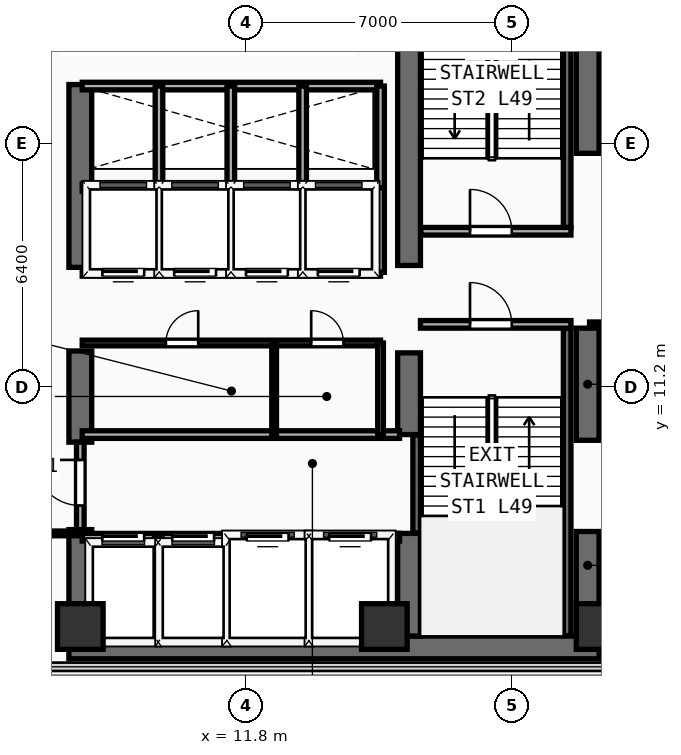
"""IFC4 building model, lengths in metres.
Left out: names, types, materials, properties, quantities, classifications, styles, units other than length and angle.
Written with IfcOpenShell. Run it as: python <this file> out.ifc"""

import sys

from ifc_helpers import new_model, si_unit, direction, frame, frame_2d, origin, origin_2d, place, context, subcontext, project, spatial, rectangle, extrude, element, fill, save


model = new_model("IFC4")
c1 = context("Model", 3, precision=1e-05, world=origin(), true_north=direction((0.0, 1.0)))
c2 = subcontext(c1, "Body", "Model", "MODEL_VIEW")
j1 = project(units=[si_unit("LENGTHUNIT", "METRE"), si_unit("PLANEANGLEUNIT", "RADIAN")], contexts=[c1])
p1 = place(None, origin())
s1 = spatial("IfcSite", under=j1, at=p1, CompositionType="ELEMENT")
p2 = place(p1, origin())
s2 = spatial("IfcBuilding", under=s1, at=p2, CompositionType="ELEMENT")
p3 = place(p2, frame((0.0, 0.0, 191.8)))
s3 = spatial("IfcBuildingStorey", under=s2, at=p3, CompositionType="ELEMENT", Elevation=191.8)
p4 = place(p3, frame((7.15, 4.35, 0.0), z_axis=(0.0, 0.0, 1.0), x_axis=(1.0, 0.0, 0.0)))
e1 = element("IfcWall", 1, at=p4, inside=s3, PredefinedType="SHEAR", context=c2, shape_type="SweptSolid", body=[
    extrude(rectangle(XDim=13.95, YDim=0.6, at=frame_2d((6.975, 0.0))), origin(), (0.0, 0.0, 1.0), 3.56),
])
p5 = place(p3, frame((7.45, 4.65, 0.0), z_axis=(0.0, 0.0, 1.0), x_axis=(0.0, 1.0, 0.0)))
e2 = element("IfcWall", 2, at=p5, inside=s3, PredefinedType="SHEAR", context=c2, shape_type="SweptSolid", body=[
    extrude(rectangle(XDim=2.8, YDim=0.6, at=frame_2d((1.4, 0.0))), origin(), (0.0, 0.0, 1.0), 3.56),
])
p6 = place(p3, frame((7.45, 9.75, 0.0), z_axis=(0.0, 0.0, 1.0), x_axis=(0.0, 1.0, 0.0)))
e3 = element("IfcWall", 3, at=p6, inside=s3, PredefinedType="SHEAR", context=c2, shape_type="SweptSolid", body=[
    extrude(rectangle(XDim=2.4, YDim=0.6, at=frame_2d((1.2, 0.0))), origin(), (0.0, 0.0, 1.0), 3.56),
])
p7 = place(p3, frame((7.45, 14.35, 0.0), z_axis=(0.0, 0.0, 1.0), x_axis=(0.0, 1.0, 0.0)))
e4 = element("IfcWall", 4, at=p7, inside=s3, PredefinedType="SHEAR", context=c2, shape_type="SweptSolid", body=[
    extrude(rectangle(XDim=4.81, YDim=0.6, at=frame_2d((2.405, 0.0))), origin(), (0.0, 0.0, 1.0), 3.56),
])
p8 = place(p3, frame((20.8, 4.65, 0.0), z_axis=(0.0, 0.0, 1.0), x_axis=(0.0, 1.0, 0.0)))
e5 = element("IfcWall", 5, at=p8, inside=s3, PredefinedType="SHEAR", context=c2, shape_type="SweptSolid", body=[
    extrude(rectangle(XDim=2.75, YDim=0.6, at=frame_2d((1.375, 0.0))), origin(), (0.0, 0.0, 1.0), 3.56),
])
p9 = place(p3, frame((20.8, 9.8, 0.0), z_axis=(0.0, 0.0, 1.0), x_axis=(0.0, 1.0, 0.0)))
e6 = element("IfcWall", 6, at=p9, inside=s3, PredefinedType="SHEAR", context=c2, shape_type="SweptSolid", body=[
    extrude(rectangle(XDim=2.95, YDim=0.6, at=frame_2d((1.475, 0.0))), origin(), (0.0, 0.0, 1.0), 3.56),
])
p10 = place(p3, frame((20.8, 17.35, 0.0), z_axis=(0.0, 0.0, 1.0), x_axis=(0.0, 1.0, 0.0)))
e7 = element("IfcWall", 7, at=p10, inside=s3, PredefinedType="SHEAR", context=c2, shape_type="SweptSolid", body=[
    extrude(rectangle(XDim=6.15, YDim=0.6, at=frame_2d((3.075, 0.0))), origin(), (0.0, 0.0, 1.0), 3.56),
])
p11 = place(p3, frame((16.1, 4.65, 0.0), z_axis=(0.0, 0.0, 1.0), x_axis=(0.0, 1.0, 0.0)))
e8 = element("IfcWall", 8, at=p11, inside=s3, PredefinedType="SHEAR", context=c2, shape_type="SweptSolid", body=[
    extrude(rectangle(XDim=2.7, YDim=0.6, at=frame_2d((1.35, 0.0))), origin(), (0.0, 0.0, 1.0), 3.56),
])
p12 = place(p3, frame((16.1, 9.95, 0.0), z_axis=(0.0, 0.0, 1.0), x_axis=(0.0, 1.0, 0.0)))
e9 = element("IfcWall", 9, at=p12, inside=s3, PredefinedType="SHEAR", context=c2, shape_type="SweptSolid", body=[
    extrude(rectangle(XDim=2.15, YDim=0.6, at=frame_2d((1.075, 0.0))), origin(), (0.0, 0.0, 1.0), 3.56),
])
p13 = place(p3, frame((16.1, 14.4, 0.0), z_axis=(0.0, 0.0, 1.0), x_axis=(0.0, 1.0, 0.0)))
e10 = element("IfcWall", 10, at=p13, inside=s3, PredefinedType="SHEAR", context=c2, shape_type="SweptSolid", body=[
    extrude(rectangle(XDim=9.1, YDim=0.6, at=frame_2d((4.55, 0.0))), origin(), (0.0, 0.0, 1.0), 3.56),
])
for number, where, z_axis, x_axis in (
    (11, (7.45, 4.9, 0.0), (0.0, 0.0, 1.0), (1.0, 0.0, 0.0)),
    (12, (15.45, 4.9, 0.0), (0.0, 0.0, 1.0), (1.0, 0.0, 0.0)),
    (13, (21.1, 4.9, 0.0), (0.0, 0.0, 1.0), (1.0, 0.0, 0.0)),
):
    element("IfcColumn", number, at=place(p3, frame(where, z_axis=z_axis, x_axis=x_axis)), inside=s3, PredefinedType="COLUMN", context=c2, shape_type="SweptSolid", body=[
        extrude(rectangle(XDim=1.2, YDim=1.2, at=origin_2d()), origin(), (0.0, 0.0, 1.0), 3.56),
    ])
p14 = place(p3, frame((16.3, 7.36, 0.0), z_axis=(0.0, 0.0, 1.0), x_axis=(0.0, 1.0, 0.0)))
e14 = element("IfcWall", 14, at=p14, inside=s3, PredefinedType="SHEAR", context=c2, shape_type="SweptSolid", body=[
    extrude(rectangle(XDim=2.58, YDim=0.2, at=frame_2d((1.29, 0.0))), origin(), (0.0, 0.0, 1.0), 3.56),
])
p15 = place(p3, frame((20.26, 4.66, 0.0), z_axis=(0.0, 0.0, 1.0), x_axis=(0.0, 1.0, 0.0)))
e15 = element("IfcWall", 15, at=p15, inside=s3, PredefinedType="SHEAR", context=c2, shape_type="SweptSolid", body=[
    extrude(rectangle(XDim=8.09, YDim=0.2, at=frame_2d((4.045, 0.0))), origin(), (0.0, 0.0, 1.0), 3.56),
])
p16 = place(p3, frame((16.4, 12.85, 0.0), z_axis=(0.0, 0.0, 1.0), x_axis=(1.0, 0.0, 0.0)))
e16 = element("IfcWall", 16, at=p16, inside=s3, PredefinedType="PARTITIONING", context=c2, shape_type="SweptSolid", body=[
    extrude(rectangle(XDim=3.96, YDim=0.2, at=frame_2d((1.98, 0.0))), origin(), (0.0, 0.0, 1.0), 3.56),
])
p17 = place(p16, frame((1.304, 0.0, 0.0)))
e17 = element("IfcOpeningElement", 17, at=p17, cuts=e16, PredefinedType="OPENING", context=c2, shape_type="SweptSolid", body=[
    extrude(rectangle(XDim=1.1, YDim=2.2, at=frame_2d((0.55, 1.1))), frame((0.0, 0.11, 0.0), z_axis=(0.0, -1.0, 0.0), x_axis=(1.0, 0.0, 0.0)), (0.0, 0.0, 1.0), 0.22),
])
p18 = place(p3, frame((20.26, 15.4, 0.0), z_axis=(0.0, 0.0, 1.0), x_axis=(0.0, 1.0, 0.0)))
e18 = element("IfcWall", 18, at=p18, inside=s3, PredefinedType="SHEAR", context=c2, shape_type="SweptSolid", body=[
    extrude(rectangle(XDim=8.09, YDim=0.2, at=frame_2d((4.045, 0.0))), origin(), (0.0, 0.0, 1.0), 3.56),
])
p19 = place(p3, frame((16.41, 15.3, 0.0), z_axis=(0.0, 0.0, 1.0), x_axis=(1.0, 0.0, 0.0)))
e19 = element("IfcWall", 19, at=p19, inside=s3, PredefinedType="PARTITIONING", context=c2, shape_type="SweptSolid", body=[
    extrude(rectangle(XDim=3.95, YDim=0.2, at=frame_2d((1.975, 0.0))), origin(), (0.0, 0.0, 1.0), 3.56),
])
p20 = place(p19, frame((1.294, 0.0, 0.0)))
e20 = element("IfcOpeningElement", 20, at=p20, cuts=e19, PredefinedType="OPENING", context=c2, shape_type="SweptSolid", body=[
    extrude(rectangle(XDim=1.1, YDim=2.2, at=frame_2d((0.55, 1.1))), frame((0.0, 0.11, 0.0), z_axis=(0.0, -1.0, 0.0), x_axis=(1.0, 0.0, 0.0)), (0.0, 0.0, 1.0), 0.22),
])
p21 = place(p3, frame((7.5, 7.25, 0.0), z_axis=(0.0, 0.0, 1.0), x_axis=(1.0, 0.0, 0.0)))
e21 = element("IfcWall", 21, at=p21, inside=s3, PredefinedType="PARTITIONING", context=c2, shape_type="SweptSolid", body=[
    extrude(rectangle(XDim=8.35, YDim=0.2, at=frame_2d((4.175, 0.0))), origin(), (0.0, 0.0, 1.0), 3.56),
])
p22 = place(p21, frame((0.53, 0.0, 0.0)))
e22 = element("IfcOpeningElement", 22, at=p22, cuts=e21, PredefinedType="OPENING", context=c2, shape_type="SweptSolid", body=[
    extrude(rectangle(XDim=1.1, YDim=2.2, at=frame_2d((0.55, 1.1))), frame((0.0, 0.11, 0.0), z_axis=(0.0, -1.0, 0.0), x_axis=(1.0, 0.0, 0.0)), (0.0, 0.0, 1.0), 0.22),
])
p23 = place(p21, frame((2.37, 0.0, 0.0)))
e23 = element("IfcOpeningElement", 23, at=p23, cuts=e21, PredefinedType="OPENING", context=c2, shape_type="SweptSolid", body=[
    extrude(rectangle(XDim=1.1, YDim=2.2, at=frame_2d((0.55, 1.1))), frame((0.0, 0.11, 0.0), z_axis=(0.0, -1.0, 0.0), x_axis=(1.0, 0.0, 0.0)), (0.0, 0.0, 1.0), 0.22),
])
p24 = place(p21, frame((4.33, 0.0, 0.0)))
e24 = element("IfcOpeningElement", 24, at=p24, cuts=e21, PredefinedType="OPENING", context=c2, shape_type="SweptSolid", body=[
    extrude(rectangle(XDim=1.1, YDim=2.2, at=frame_2d((0.55, 1.1))), frame((0.0, 0.11, 0.0), z_axis=(0.0, -1.0, 0.0), x_axis=(1.0, 0.0, 0.0)), (0.0, 0.0, 1.0), 0.22),
])
p25 = place(p21, frame((6.5, 0.0, 0.0)))
e25 = element("IfcOpeningElement", 25, at=p25, cuts=e21, PredefinedType="OPENING", context=c2, shape_type="SweptSolid", body=[
    extrude(rectangle(XDim=1.1, YDim=2.2, at=frame_2d((0.55, 1.1))), frame((0.0, 0.11, 0.0), z_axis=(0.0, -1.0, 0.0), x_axis=(1.0, 0.0, 0.0)), (0.0, 0.0, 1.0), 0.22),
])
p26 = place(p3, frame((7.5, 9.95, 0.0), z_axis=(0.0, 0.0, 1.0), x_axis=(1.0, 0.0, 0.0)))
e26 = element("IfcWall", 26, at=p26, inside=s3, PredefinedType="PARTITIONING", context=c2, shape_type="SweptSolid", body=[
    extrude(rectangle(XDim=8.35, YDim=0.2, at=frame_2d((4.175, 0.0))), origin(), (0.0, 0.0, 1.0), 3.56),
])
for number, where, z_axis, x_axis in (
    (27, (9.5, 4.45, 0.0), (0.0, 0.0, 1.0), (0.0, 1.0, 0.0)),
    (28, (11.36, 4.45, 0.0), (0.0, 0.0, 1.0), (0.0, 1.0, 0.0)),
    (29, (13.46, 4.45, 0.0), (0.0, 0.0, 1.0), (0.0, 1.0, 0.0)),
):
    element("IfcWall", number, at=place(p3, frame(where, z_axis=z_axis, x_axis=x_axis)), inside=s3, PredefinedType="PARTITIONING", context=c2, shape_type="SweptSolid", body=[
        extrude(rectangle(XDim=2.8, YDim=0.2, at=frame_2d((1.4, 0.0))), origin(), (0.0, 0.0, 1.0), 3.56),
    ])
p27 = place(p3, frame((7.45, 7.45, 0.0), z_axis=(0.0, 0.0, 1.0), x_axis=(0.0, 1.0, 0.0)))
e30 = element("IfcWall", 30, at=p27, inside=s3, PredefinedType="PARTITIONING", context=c2, shape_type="SweptSolid", body=[
    extrude(rectangle(XDim=2.3, YDim=0.2, at=frame_2d((1.15, 0.0))), origin(), (0.0, 0.0, 1.0), 2.54),
])
p28 = place(p27, frame((0.633, 0.0, 0.0)))
e31 = element("IfcOpeningElement", 31, at=p28, cuts=e30, PredefinedType="OPENING", context=c2, shape_type="SweptSolid", body=[
    extrude(rectangle(XDim=1.2, YDim=2.25, at=frame_2d((0.6, 1.125))), frame((0.0, 0.11, 0.0), z_axis=(0.0, -1.0, 0.0), x_axis=(1.0, 0.0, 0.0)), (0.0, 0.0, 1.0), 0.22),
])
p29 = place(p3, frame((7.5, 12.36, 0.0), z_axis=(0.0, 0.0, 1.0), x_axis=(1.0, 0.0, 0.0)))
e32 = element("IfcWall", 32, at=p29, inside=s3, PredefinedType="PARTITIONING", context=c2, shape_type="SweptSolid", body=[
    extrude(rectangle(XDim=7.85, YDim=0.15, at=frame_2d((3.925, 0.0))), origin(), (0.0, 0.0, 1.0), 3.56),
])
p30 = place(p29, frame((2.202, 0.0, 0.0)))
e33 = element("IfcOpeningElement", 33, at=p30, cuts=e32, PredefinedType="OPENING", context=c2, shape_type="SweptSolid", body=[
    extrude(rectangle(XDim=0.85, YDim=2.15, at=frame_2d((0.425, 1.075))), frame((0.0, 0.085, 0.0), z_axis=(0.0, -1.0, 0.0), x_axis=(1.0, 0.0, 0.0)), (0.0, 0.0, 1.0), 0.17),
])
p31 = place(p29, frame((6.025, 0.0, 0.0)))
e34 = element("IfcOpeningElement", 34, at=p31, cuts=e32, PredefinedType="OPENING", context=c2, shape_type="SweptSolid", body=[
    extrude(rectangle(XDim=0.85, YDim=2.15, at=frame_2d((0.425, 1.075))), frame((0.0, 0.085, 0.0), z_axis=(0.0, -1.0, 0.0), x_axis=(1.0, 0.0, 0.0)), (0.0, 0.0, 1.0), 0.17),
])
p32 = place(p3, frame((15.35, 9.95, 0.0), z_axis=(0.0, 0.0, 1.0), x_axis=(0.0, 1.0, 0.0)))
e35 = element("IfcWall", 35, at=p32, inside=s3, PredefinedType="PARTITIONING", context=c2, shape_type="SweptSolid", body=[
    extrude(rectangle(XDim=2.41, YDim=0.15, at=frame_2d((1.205, 0.0))), origin(), (0.0, 0.0, 1.0), 3.56),
])
p33 = place(p3, frame((12.55, 9.95, 0.0), z_axis=(0.0, 0.0, 1.0), x_axis=(0.0, 1.0, 0.0)))
e36 = element("IfcWall", 36, at=p33, inside=s3, PredefinedType="PARTITIONING", context=c2, shape_type="SweptSolid", body=[
    extrude(rectangle(XDim=2.41, YDim=0.125, at=frame_2d((1.205, 0.0))), origin(), (0.0, 0.0, 1.0), 3.56),
])
p34 = place(p3, frame((7.5, 14.22, 0.0), z_axis=(0.0, 0.0, 1.0), x_axis=(1.0, 0.0, 0.0)))
e37 = element("IfcWall", 37, at=p34, inside=s3, PredefinedType="PARTITIONING", context=c2, shape_type="SweptSolid", body=[
    extrude(rectangle(XDim=7.85, YDim=0.2, at=frame_2d((3.925, 0.0))), origin(), (0.0, 0.0, 1.0), 3.56),
])
p35 = place(p34, frame((0.53, 0.0, 0.0)))
e38 = element("IfcOpeningElement", 38, at=p35, cuts=e37, PredefinedType="OPENING", context=c2, shape_type="SweptSolid", body=[
    extrude(rectangle(XDim=1.1, YDim=2.2, at=frame_2d((0.55, 1.1))), frame((0.0, 0.11, 0.0), z_axis=(0.0, -1.0, 0.0), x_axis=(1.0, 0.0, 0.0)), (0.0, 0.0, 1.0), 0.22),
])
p36 = place(p34, frame((2.42, 0.0, 0.0)))
e39 = element("IfcOpeningElement", 39, at=p36, cuts=e37, PredefinedType="OPENING", context=c2, shape_type="SweptSolid", body=[
    extrude(rectangle(XDim=1.1, YDim=2.2, at=frame_2d((0.55, 1.1))), frame((0.0, 0.11, 0.0), z_axis=(0.0, -1.0, 0.0), x_axis=(1.0, 0.0, 0.0)), (0.0, 0.0, 1.0), 0.22),
])
p37 = place(p34, frame((4.31, 0.0, 0.0)))
e40 = element("IfcOpeningElement", 40, at=p37, cuts=e37, PredefinedType="OPENING", context=c2, shape_type="SweptSolid", body=[
    extrude(rectangle(XDim=1.1, YDim=2.2, at=frame_2d((0.55, 1.1))), frame((0.0, 0.11, 0.0), z_axis=(0.0, -1.0, 0.0), x_axis=(1.0, 0.0, 0.0)), (0.0, 0.0, 1.0), 0.22),
])
p38 = place(p34, frame((6.2, 0.0, 0.0)))
e41 = element("IfcOpeningElement", 41, at=p38, cuts=e37, PredefinedType="OPENING", context=c2, shape_type="SweptSolid", body=[
    extrude(rectangle(XDim=1.1, YDim=2.2, at=frame_2d((0.55, 1.1))), frame((0.0, 0.11, 0.0), z_axis=(0.0, -1.0, 0.0), x_axis=(1.0, 0.0, 0.0)), (0.0, 0.0, 1.0), 0.22),
])
p39 = place(p3, frame((7.5, 16.45, 0.0), z_axis=(0.0, 0.0, 1.0), x_axis=(1.0, 0.0, 0.0)))
e42 = element("IfcWall", 42, at=p39, inside=s3, PredefinedType="PARTITIONING", context=c2, shape_type="SweptSolid", body=[
    extrude(rectangle(XDim=7.85, YDim=0.2, at=frame_2d((3.925, 0.0))), origin(), (0.0, 0.0, 1.0), 3.56),
])
for number, where, z_axis, x_axis in (
    (43, (15.35, 14.22, 0.0), (0.0, 0.0, 1.0), (0.0, 1.0, 0.0)),
    (44, (9.52, 14.22, 0.0), (0.0, 0.0, 1.0), (0.0, 1.0, 0.0)),
    (45, (11.41, 14.22, 0.0), (0.0, 0.0, 1.0), (0.0, 1.0, 0.0)),
    (46, (13.3, 14.22, 0.0), (0.0, 0.0, 1.0), (0.0, 1.0, 0.0)),
):
    element("IfcWall", number, at=place(p3, frame(where, z_axis=z_axis, x_axis=x_axis)), inside=s3, PredefinedType="PARTITIONING", context=c2, shape_type="SweptSolid", body=[
        extrude(rectangle(XDim=2.23, YDim=0.2, at=frame_2d((1.115, 0.0))), origin(), (0.0, 0.0, 1.0), 3.56),
    ])
p40 = place(p3, frame((7.5, 19.12, 0.0), z_axis=(0.0, 0.0, 1.0), x_axis=(1.0, 0.0, 0.0)))
e47 = element("IfcWall", 47, at=p40, inside=s3, PredefinedType="PARTITIONING", context=c2, shape_type="SweptSolid", body=[
    extrude(rectangle(XDim=7.85, YDim=0.2, at=frame_2d((3.925, 0.0))), origin(), (0.0, 0.0, 1.0), 3.56),
])
for number, where, z_axis, x_axis in (
    (48, (15.35, 16.45, 0.0), (0.0, 0.0, 1.0), (0.0, 1.0, 0.0)),
    (49, (9.52, 16.45, 0.0), (0.0, 0.0, 1.0), (0.0, 1.0, 0.0)),
    (50, (11.41, 16.45, 0.0), (0.0, 0.0, 1.0), (0.0, 1.0, 0.0)),
    (51, (13.3, 16.45, 0.0), (0.0, 0.0, 1.0), (0.0, 1.0, 0.0)),
):
    element("IfcWall", number, at=place(p3, frame(where, z_axis=z_axis, x_axis=x_axis)), inside=s3, PredefinedType="PARTITIONING", context=c2, shape_type="SweptSolid", body=[
        extrude(rectangle(XDim=2.67, YDim=0.2, at=frame_2d((1.335, 0.0))), origin(), (0.0, 0.0, 1.0), 3.56),
    ])
p41 = place(p3, frame((4.04, 7.35, 0.0), z_axis=(0.0, 0.0, 1.0), x_axis=(1.0, 0.0, 0.0)))
e52 = element("IfcWall", 52, at=p41, inside=s3, PredefinedType="PARTITIONING", context=c2, shape_type="SweptSolid", body=[
    extrude(rectangle(XDim=3.36, YDim=0.125, at=frame_2d((1.68, 0.0))), origin(), (0.0, 0.0, 1.0), 3.56),
])
p42 = place(p41, frame((1.687, 0.0, 0.0)))
e53 = element("IfcOpeningElement", 53, at=p42, cuts=e52, PredefinedType="OPENING", context=c2, shape_type="SweptSolid", body=[
    extrude(rectangle(XDim=0.85, YDim=2.15, at=frame_2d((0.425, 1.075))), frame((0.0, 0.073, 0.0), z_axis=(0.0, -1.0, 0.0), x_axis=(1.0, 0.0, 0.0)), (0.0, 0.0, 1.0), 0.145),
])
p43 = place(p3, frame((20.85, 12.85, 0.0), z_axis=(0.0, 0.0, 1.0), x_axis=(1.0, 0.0, 0.0)))
e54 = element("IfcWall", 54, at=p43, inside=s3, PredefinedType="PARTITIONING", context=c2, shape_type="SweptSolid", body=[
    extrude(rectangle(XDim=7.05, YDim=0.125, at=frame_2d((3.525, 0.0))), origin(), (0.0, 0.0, 1.0), 3.56),
])
p44 = place(p43, frame((2.8, 0.0, 0.0)))
e55 = element("IfcOpeningElement", 55, at=p44, cuts=e54, PredefinedType="OPENING", context=c2, shape_type="SweptSolid", body=[
    extrude(rectangle(XDim=0.95, YDim=2.15, at=frame_2d((0.475, 1.075))), frame((0.0, 0.073, 0.0), z_axis=(0.0, -1.0, 0.0), x_axis=(1.0, 0.0, 0.0)), (0.0, 0.0, 1.0), 0.145),
])
p45 = place(p17, frame((1.1, 0.0, 0.0), z_axis=(0.0, 0.0, 1.0), x_axis=(-1.0, 0.0, 0.0)))
e56 = element("IfcDoor", 56, at=p45, inside=s3, OperationType="SINGLE_SWING_RIGHT", PredefinedType="DOOR", context=c2, shape_type="SweptSolid", body=[
    extrude(rectangle(XDim=1.1, YDim=2.2, at=frame_2d((0.55, 1.1))), frame((0.0, 0.025, 0.0), z_axis=(0.0, -1.0, 0.0), x_axis=(1.0, 0.0, 0.0)), (0.0, 0.0, 1.0), 0.05),
])
fill(e17, e56)
p46 = place(p20, origin())
e57 = element("IfcDoor", 57, at=p46, inside=s3, OperationType="SINGLE_SWING_LEFT", PredefinedType="DOOR", context=c2, shape_type="SweptSolid", body=[
    extrude(rectangle(XDim=1.1, YDim=2.2, at=frame_2d((0.55, 1.1))), frame((0.0, 0.025, 0.0), z_axis=(0.0, -1.0, 0.0), x_axis=(1.0, 0.0, 0.0)), (0.0, 0.0, 1.0), 0.05),
])
fill(e20, e57)
p47 = place(p22, origin())
e58 = element("IfcDoor", 58, at=p47, inside=s3, OperationType="SLIDING_TO_LEFT", PredefinedType="DOOR", context=c2, shape_type="SweptSolid", body=[
    extrude(rectangle(XDim=1.1, YDim=2.2, at=frame_2d((0.55, 1.1))), frame((0.0, 0.025, 0.0), z_axis=(0.0, -1.0, 0.0), x_axis=(1.0, 0.0, 0.0)), (0.0, 0.0, 1.0), 0.05),
])
fill(e22, e58)
p48 = place(p23, origin())
e59 = element("IfcDoor", 59, at=p48, inside=s3, OperationType="SLIDING_TO_LEFT", PredefinedType="DOOR", context=c2, shape_type="SweptSolid", body=[
    extrude(rectangle(XDim=1.1, YDim=2.2, at=frame_2d((0.55, 1.1))), frame((0.0, 0.025, 0.0), z_axis=(0.0, -1.0, 0.0), x_axis=(1.0, 0.0, 0.0)), (0.0, 0.0, 1.0), 0.05),
])
fill(e23, e59)
p49 = place(p24, origin())
e60 = element("IfcDoor", 60, at=p49, inside=s3, OperationType="SLIDING_TO_LEFT", PredefinedType="DOOR", context=c2, shape_type="SweptSolid", body=[
    extrude(rectangle(XDim=1.1, YDim=2.2, at=frame_2d((0.55, 1.1))), frame((0.0, 0.025, 0.0), z_axis=(0.0, -1.0, 0.0), x_axis=(1.0, 0.0, 0.0)), (0.0, 0.0, 1.0), 0.05),
])
fill(e24, e60)
p50 = place(p25, origin())
e61 = element("IfcDoor", 61, at=p50, inside=s3, OperationType="SLIDING_TO_LEFT", PredefinedType="DOOR", context=c2, shape_type="SweptSolid", body=[
    extrude(rectangle(XDim=1.1, YDim=2.2, at=frame_2d((0.55, 1.1))), frame((0.0, 0.025, 0.0), z_axis=(0.0, -1.0, 0.0), x_axis=(1.0, 0.0, 0.0)), (0.0, 0.0, 1.0), 0.05),
])
fill(e25, e61)
p51 = place(p28, frame((1.2, 0.0, 0.0), z_axis=(0.0, 0.0, 1.0), x_axis=(-1.0, 0.0, 0.0)))
e62 = element("IfcDoor", 62, at=p51, inside=s3, OperationType="SINGLE_SWING_LEFT", PredefinedType="DOOR", context=c2, shape_type="SweptSolid", body=[
    extrude(rectangle(XDim=1.2, YDim=2.25, at=frame_2d((0.6, 1.125))), frame((0.0, 0.025, 0.0), z_axis=(0.0, -1.0, 0.0), x_axis=(1.0, 0.0, 0.0)), (0.0, 0.0, 1.0), 0.05),
])
fill(e31, e62)
p52 = place(p30, origin())
e63 = element("IfcDoor", 63, at=p52, inside=s3, OperationType="SINGLE_SWING_RIGHT", PredefinedType="DOOR", context=c2, shape_type="SweptSolid", body=[
    extrude(rectangle(XDim=0.85, YDim=2.15, at=frame_2d((0.425, 1.075))), frame((0.0, 0.025, 0.0), z_axis=(0.0, -1.0, 0.0), x_axis=(1.0, 0.0, 0.0)), (0.0, 0.0, 1.0), 0.05),
])
fill(e33, e63)
p53 = place(p31, origin())
e64 = element("IfcDoor", 64, at=p53, inside=s3, OperationType="SINGLE_SWING_LEFT", PredefinedType="DOOR", context=c2, shape_type="SweptSolid", body=[
    extrude(rectangle(XDim=0.85, YDim=2.15, at=frame_2d((0.425, 1.075))), frame((0.0, 0.025, 0.0), z_axis=(0.0, -1.0, 0.0), x_axis=(1.0, 0.0, 0.0)), (0.0, 0.0, 1.0), 0.05),
])
fill(e34, e64)
p54 = place(p35, frame((1.1, 0.0, 0.0), z_axis=(0.0, 0.0, 1.0), x_axis=(-1.0, 0.0, 0.0)))
e65 = element("IfcDoor", 65, at=p54, inside=s3, OperationType="SLIDING_TO_LEFT", PredefinedType="DOOR", context=c2, shape_type="SweptSolid", body=[
    extrude(rectangle(XDim=1.1, YDim=2.2, at=frame_2d((0.55, 1.1))), frame((0.0, 0.025, 0.0), z_axis=(0.0, -1.0, 0.0), x_axis=(1.0, 0.0, 0.0)), (0.0, 0.0, 1.0), 0.05),
])
fill(e38, e65)
p55 = place(p36, frame((1.1, 0.0, 0.0), z_axis=(0.0, 0.0, 1.0), x_axis=(-1.0, 0.0, 0.0)))
e66 = element("IfcDoor", 66, at=p55, inside=s3, OperationType="SLIDING_TO_LEFT", PredefinedType="DOOR", context=c2, shape_type="SweptSolid", body=[
    extrude(rectangle(XDim=1.1, YDim=2.2, at=frame_2d((0.55, 1.1))), frame((0.0, 0.025, 0.0), z_axis=(0.0, -1.0, 0.0), x_axis=(1.0, 0.0, 0.0)), (0.0, 0.0, 1.0), 0.05),
])
fill(e39, e66)
p56 = place(p37, frame((1.1, 0.0, 0.0), z_axis=(0.0, 0.0, 1.0), x_axis=(-1.0, 0.0, 0.0)))
e67 = element("IfcDoor", 67, at=p56, inside=s3, OperationType="SLIDING_TO_LEFT", PredefinedType="DOOR", context=c2, shape_type="SweptSolid", body=[
    extrude(rectangle(XDim=1.1, YDim=2.2, at=frame_2d((0.55, 1.1))), frame((0.0, 0.025, 0.0), z_axis=(0.0, -1.0, 0.0), x_axis=(1.0, 0.0, 0.0)), (0.0, 0.0, 1.0), 0.05),
])
fill(e40, e67)
p57 = place(p38, frame((1.1, 0.0, 0.0), z_axis=(0.0, 0.0, 1.0), x_axis=(-1.0, 0.0, 0.0)))
e68 = element("IfcDoor", 68, at=p57, inside=s3, OperationType="SLIDING_TO_LEFT", PredefinedType="DOOR", context=c2, shape_type="SweptSolid", body=[
    extrude(rectangle(XDim=1.1, YDim=2.2, at=frame_2d((0.55, 1.1))), frame((0.0, 0.025, 0.0), z_axis=(0.0, -1.0, 0.0), x_axis=(1.0, 0.0, 0.0)), (0.0, 0.0, 1.0), 0.05),
])
fill(e41, e68)
save(model, sys.argv[1])
